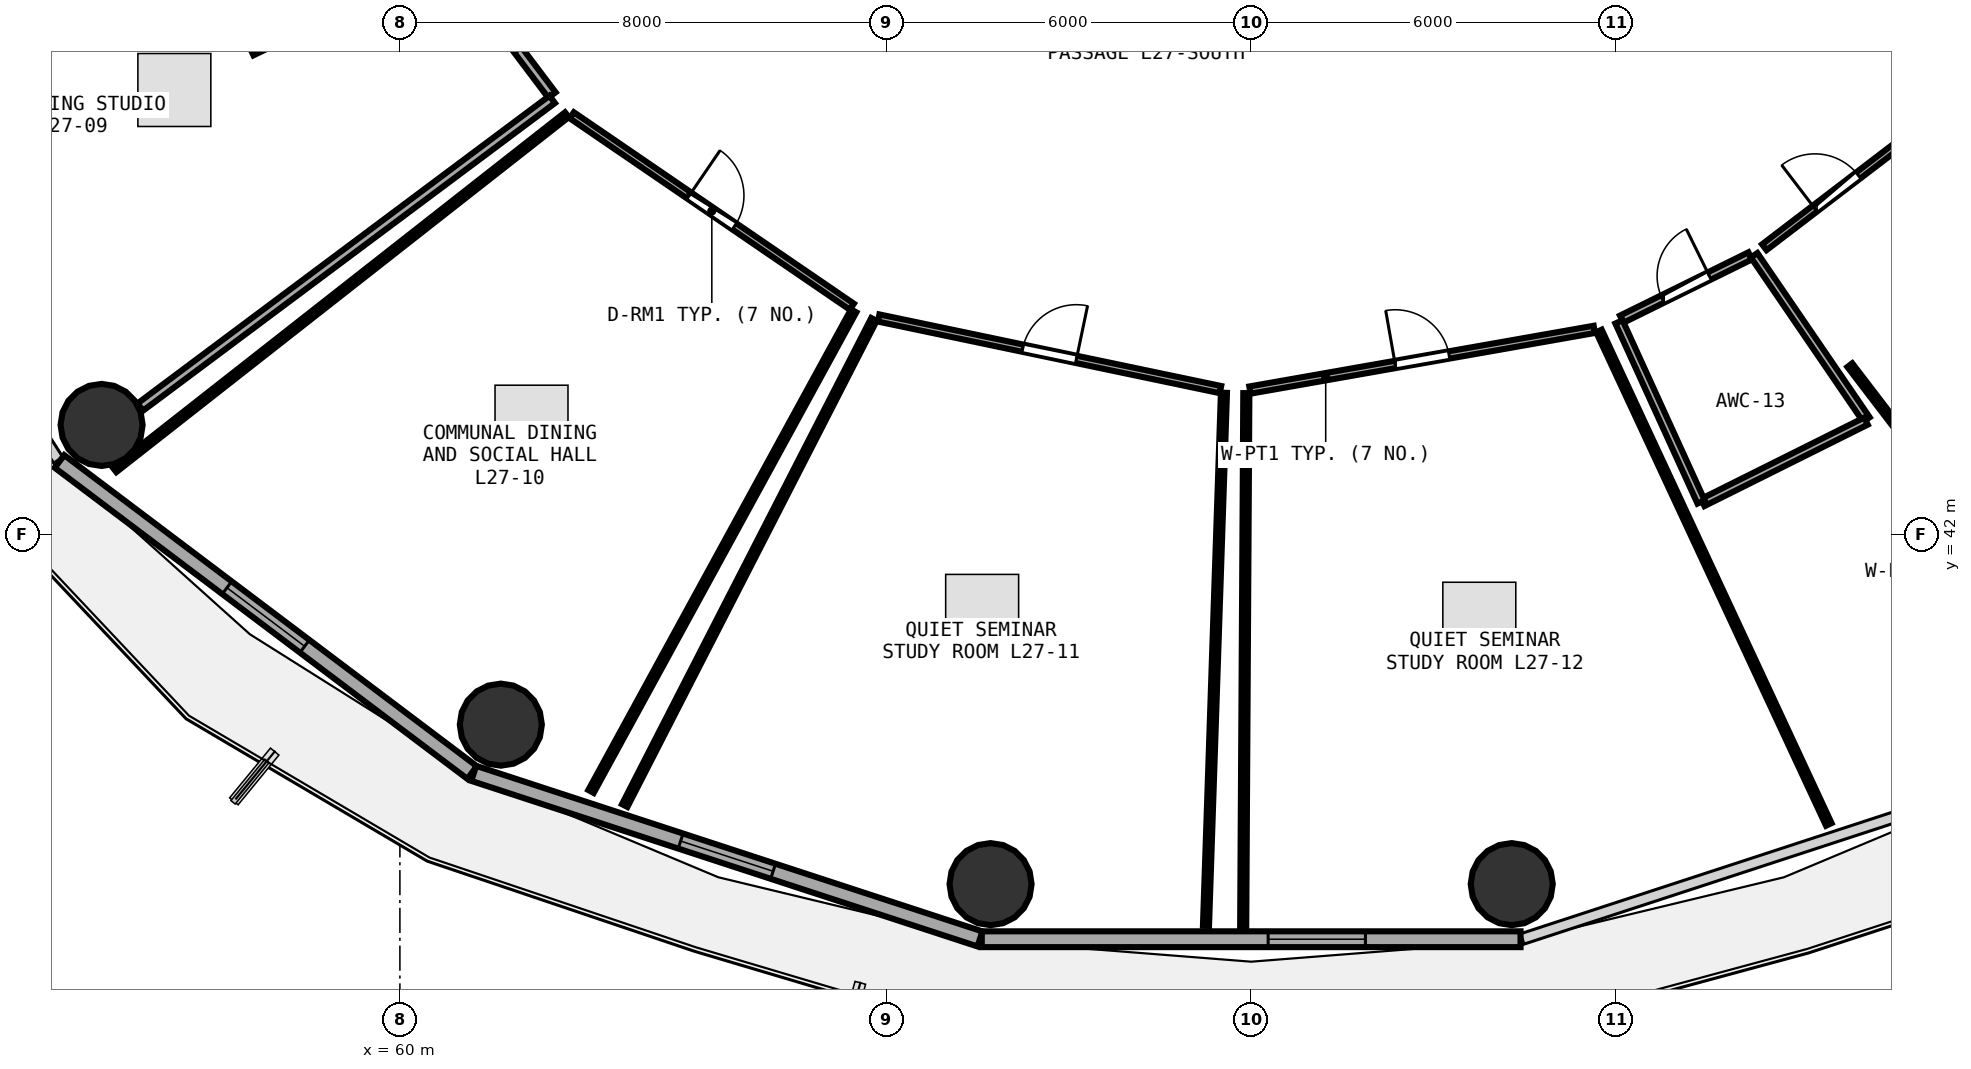
"""IFC4 building model, lengths in metres.
Left out: names, types, materials, properties, quantities, classifications, styles, units other than length and angle.
Written with IfcOpenShell. Run it as: python <this file> out.ifc"""

import sys

from ifc_helpers import new_model, si_unit, direction, frame, frame_2d, origin, origin_2d, place, context, subcontext, project, spatial, rectangle, circle, extrude, element, fill, save


model = new_model("IFC4")
c1 = context("Model", 3, precision=1e-05, world=origin(), true_north=direction((0.0, 1.0)))
c2 = subcontext(c1, "Body", "Model", "MODEL_VIEW")
j1 = project(units=[si_unit("LENGTHUNIT", "METRE"), si_unit("PLANEANGLEUNIT", "RADIAN")], contexts=[c1])
p1 = place(None, origin())
s1 = spatial("IfcSite", under=j1, at=p1, CompositionType="ELEMENT")
p2 = place(p1, origin())
s2 = spatial("IfcBuilding", under=s1, at=p2, CompositionType="ELEMENT")
p3 = place(p2, frame((0.0, 0.0, 106.35)))
s3 = spatial("IfcBuildingStorey", under=s2, at=p3, CompositionType="ELEMENT", Elevation=106.35)
for number, where, z_axis, x_axis in (
    (1, (55.094, 43.807, 0.0), (0.0, 0.0, 1.0), (1.0, 0.0, 0.0)),
    (2, (61.66, 38.878, 0.0), (0.0, 0.0, 1.0), (1.0, 0.0, 0.0)),
    (3, (69.714, 36.255, 0.0), (0.0, 0.0, 1.0), (1.0, 0.0, 0.0)),
    (4, (78.286, 36.255, 0.0), (0.0, 0.0, 1.0), (1.0, 0.0, 0.0)),
):
    element("IfcColumn", number, at=place(p3, frame(where, z_axis=z_axis, x_axis=x_axis)), inside=s3, PredefinedType="COLUMN", context=c2, shape_type="SweptSolid", body=[
        extrude(circle(Radius=0.675, at=origin_2d()), origin(), (0.0, 0.0, 1.0), 3.75),
    ])
p4 = place(p3, frame((54.401, 43.207, 0.0), z_axis=(0.0, 0.0, 1.0), x_axis=(0.798501507879, -0.601992808857, 0.0)))
e5 = element("IfcWall", 5, at=p4, inside=s3, PredefinedType="SOLIDWALL", context=c2, shape_type="SweptSolid", body=[
    extrude(rectangle(XDim=8.499, YDim=0.26, at=frame_2d((4.25, 0.0))), origin(), (0.0, 0.0, 1.0), 3.475),
])
p5 = place(p4, frame((3.45, 0.0, 0.85)))
e6 = element("IfcOpeningElement", 6, at=p5, cuts=e5, PredefinedType="OPENING", context=c2, shape_type="SweptSolid", body=[
    extrude(rectangle(XDim=1.6, YDim=1.45, at=frame_2d((0.8, 0.725))), frame((0.0, 0.14, 0.0), z_axis=(0.0, -1.0, 0.0), x_axis=(1.0, 0.0, 0.0)), (0.0, 0.0, 1.0), 0.28),
])
p6 = place(p3, frame((61.214, 38.077, 0.0), z_axis=(0.0, 0.0, 1.0), x_axis=(0.950471101963, -0.310812941064, 0.0)))
e7 = element("IfcWall", 7, at=p6, inside=s3, PredefinedType="SOLIDWALL", context=c2, shape_type="SweptSolid", body=[
    extrude(rectangle(XDim=8.76, YDim=0.26, at=frame_2d((4.38, 0.0))), origin(), (0.0, 0.0, 1.0), 3.475),
])
p7 = place(p6, frame((3.58, 0.0, 0.85)))
e8 = element("IfcOpeningElement", 8, at=p7, cuts=e7, PredefinedType="OPENING", context=c2, shape_type="SweptSolid", body=[
    extrude(rectangle(XDim=1.6, YDim=1.45, at=frame_2d((0.8, 0.725))), frame((0.0, 0.14, 0.0), z_axis=(0.0, -1.0, 0.0), x_axis=(1.0, 0.0, 0.0)), (0.0, 0.0, 1.0), 0.28),
])
p8 = place(p3, frame((69.57, 35.349, 0.0), z_axis=(0.0, 0.0, 1.0), x_axis=(1.0, 0.0, 0.0)))
e9 = element("IfcWall", 9, at=p8, inside=s3, PredefinedType="SOLIDWALL", context=c2, shape_type="SweptSolid", body=[
    extrude(rectangle(XDim=8.861, YDim=0.26, at=frame_2d((4.43, 0.0))), origin(), (0.0, 0.0, 1.0), 3.475),
])
p9 = place(p8, frame((4.71, 0.0, 0.85)))
e10 = element("IfcOpeningElement", 10, at=p9, cuts=e9, PredefinedType="OPENING", context=c2, shape_type="SweptSolid", body=[
    extrude(rectangle(XDim=1.6, YDim=1.45, at=frame_2d((0.8, 0.725))), frame((0.0, 0.14, 0.0), z_axis=(0.0, -1.0, 0.0), x_axis=(1.0, 0.0, 0.0)), (0.0, 0.0, 1.0), 0.28),
])
p10 = place(p3, frame((60.827, 51.45, 0.0), z_axis=(0.0, 0.0, 1.0), x_axis=(0.602330864847, -0.798246534131, 0.0)))
e11 = element("IfcWall", 11, at=p10, inside=s3, PredefinedType="PARTITIONING", context=c2, shape_type="SweptSolid", body=[
    extrude(rectangle(XDim=2.779, YDim=0.15, at=frame_2d((1.389, 0.0))), origin(), (0.0, 0.0, 1.0), 2.925),
])
p11 = place(p10, frame((0.914, 0.0, 0.0)))
e12 = element("IfcOpeningElement", 12, at=p11, cuts=e11, PredefinedType="OPENING", context=c2, shape_type="SweptSolid", body=[
    extrude(rectangle(XDim=0.95, YDim=2.08, at=frame_2d((0.475, 1.04))), frame((0.0, 0.085, 0.0), z_axis=(0.0, -1.0, 0.0), x_axis=(1.0, 0.0, 0.0)), (0.0, 0.0, 1.0), 0.17),
])
p12 = place(p3, frame((62.827, 48.899, 0.0), z_axis=(0.0, 0.0, 1.0), x_axis=(0.825618475233, -0.564228795219, 0.0)))
e13 = element("IfcWall", 13, at=p12, inside=s3, PredefinedType="PARTITIONING", context=c2, shape_type="SweptSolid", body=[
    extrude(rectangle(XDim=5.578, YDim=0.12, at=frame_2d((2.789, 0.0))), origin(), (0.0, 0.0, 1.0), 2.925),
])
p13 = place(p12, frame((2.339, 0.0, 0.0)))
e14 = element("IfcOpeningElement", 14, at=p13, cuts=e13, PredefinedType="OPENING", context=c2, shape_type="SweptSolid", body=[
    extrude(rectangle(XDim=0.9, YDim=2.08, at=frame_2d((0.45, 1.04))), frame((0.0, 0.07, 0.0), z_axis=(0.0, -1.0, 0.0), x_axis=(1.0, 0.0, 0.0)), (0.0, 0.0, 1.0), 0.14),
])
p14 = place(p3, frame((67.874, 45.566, 0.0), z_axis=(0.0, 0.0, 1.0), x_axis=(0.978759890472, -0.205009943184, 0.0)))
e15 = element("IfcWall", 15, at=p14, inside=s3, PredefinedType="PARTITIONING", context=c2, shape_type="SweptSolid", body=[
    extrude(rectangle(XDim=5.744, YDim=0.12, at=frame_2d((2.872, 0.0))), origin(), (0.0, 0.0, 1.0), 3.235),
])
p15 = place(p14, frame((2.422, 0.0, 0.0)))
e16 = element("IfcOpeningElement", 16, at=p15, cuts=e15, PredefinedType="OPENING", context=c2, shape_type="SweptSolid", body=[
    extrude(rectangle(XDim=0.9, YDim=2.08, at=frame_2d((0.45, 1.04))), frame((0.0, 0.07, 0.0), z_axis=(0.0, -1.0, 0.0), x_axis=(1.0, 0.0, 0.0)), (0.0, 0.0, 1.0), 0.14),
])
p16 = place(p3, frame((73.98, 44.38, 0.0), z_axis=(0.0, 0.0, 1.0), x_axis=(0.984819435921, 0.17358190756, 0.0)))
e17 = element("IfcWall", 17, at=p16, inside=s3, PredefinedType="PARTITIONING", context=c2, shape_type="SweptSolid", body=[
    extrude(rectangle(XDim=5.751, YDim=0.12, at=frame_2d((2.875, 0.0))), origin(), (0.0, 0.0, 1.0), 3.235),
])
p17 = place(p16, frame((2.426, 0.0, 0.0)))
e18 = element("IfcOpeningElement", 18, at=p17, cuts=e17, PredefinedType="OPENING", context=c2, shape_type="SweptSolid", body=[
    extrude(rectangle(XDim=0.9, YDim=2.08, at=frame_2d((0.45, 1.04))), frame((0.0, 0.07, 0.0), z_axis=(0.0, -1.0, 0.0), x_axis=(1.0, 0.0, 0.0)), (0.0, 0.0, 1.0), 0.14),
])
p18 = place(p3, frame((80.095, 45.546, 0.0), z_axis=(0.0, 0.0, 1.0), x_axis=(0.897003770221, 0.442022891046, 0.0)))
e19 = element("IfcWall", 19, at=p18, inside=s3, PredefinedType="PLUMBINGWALL", context=c2, shape_type="SweptSolid", body=[
    extrude(rectangle(XDim=2.355, YDim=0.13, at=frame_2d((1.178, 0.0))), origin(), (0.0, 0.0, 1.0), 2.925),
])
p19 = place(p18, frame((0.747, 0.0, 0.0)))
e20 = element("IfcOpeningElement", 20, at=p19, cuts=e19, PredefinedType="OPENING", context=c2, shape_type="SweptSolid", body=[
    extrude(rectangle(XDim=0.86, YDim=2.05, at=frame_2d((0.43, 1.025))), frame((0.0, 0.075, 0.0), z_axis=(0.0, -1.0, 0.0), x_axis=(1.0, 0.0, 0.0)), (0.0, 0.0, 1.0), 0.15),
])
p20 = place(p3, frame((82.44, 46.729, 0.0), z_axis=(0.0, 0.0, 1.0), x_axis=(0.794654066843, 0.607062528945, 0.0)))
e21 = element("IfcWall", 21, at=p20, inside=s3, PredefinedType="PARTITIONING", context=c2, shape_type="SweptSolid", body=[
    extrude(rectangle(XDim=2.993, YDim=0.12, at=frame_2d((1.497, 0.0))), origin(), (0.0, 0.0, 1.0), 2.925),
])
p21 = place(p20, frame((1.047, 0.0, 0.0)))
e22 = element("IfcOpeningElement", 22, at=p21, cuts=e21, PredefinedType="OPENING", context=c2, shape_type="SweptSolid", body=[
    extrude(rectangle(XDim=0.9, YDim=2.08, at=frame_2d((0.45, 1.04))), frame((0.0, 0.07, 0.0), z_axis=(0.0, -1.0, 0.0), x_axis=(1.0, 0.0, 0.0)), (0.0, 0.0, 1.0), 0.14),
])
p22 = place(p3, frame((62.505, 49.16, 0.0), z_axis=(0.0, 0.0, 1.0), x_axis=(-0.801231684565, -0.598354232582, 0.0)))
e23 = element("IfcWall", 23, at=p22, inside=s3, PredefinedType="PARTITIONING", context=c2, shape_type="SweptSolid", body=[
    extrude(rectangle(XDim=8.456, YDim=0.15, at=frame_2d((4.228, 0.0))), origin(), (0.0, 0.0, 1.0), 2.925),
])
p23 = place(p3, frame((57.559, 49.953, 0.0), z_axis=(0.0, 0.0, 1.0), x_axis=(0.902185129063, 0.431349038364, 0.0)))
e24 = element("IfcWall", 24, at=p23, inside=s3, PredefinedType="PARTITIONING", context=c2, shape_type="SweptSolid", body=[
    extrude(rectangle(XDim=1.298, YDim=0.15, at=frame_2d((0.649, 0.0))), origin(), (0.0, 0.0, 1.0), 3.175),
])
p24 = place(p3, frame((67.463, 45.683, 0.0), z_axis=(0.0, 0.0, 1.0), x_axis=(-0.479571724153, -0.87750268455, 0.0)))
e25 = element("IfcWall", 25, at=p24, inside=s3, PredefinedType="PARTITIONING", context=c2, shape_type="SweptSolid", body=[
    extrude(rectangle(XDim=9.007, YDim=0.1, at=frame_2d((4.503, 0.0))), origin(), (0.0, 0.0, 1.0), 2.925),
])
p25 = place(p3, frame((55.305, 43.071, 0.0), z_axis=(0.0, 0.0, 1.0), x_axis=(0.78679196563, 0.6172182781, 0.0)))
e26 = element("IfcWall", 26, at=p25, inside=s3, PredefinedType="PARTITIONING", context=c2, shape_type="SweptSolid", body=[
    extrude(rectangle(XDim=9.458, YDim=0.1, at=frame_2d((4.729, 0.0))), origin(), (0.0, 0.0, 1.0), 2.925),
])
p26 = place(p3, frame((73.553, 44.336, 0.0), z_axis=(0.0, 0.0, 1.0), x_axis=(-0.033680921614, -0.999432636809, 0.0)))
e27 = element("IfcWall", 27, at=p26, inside=s3, PredefinedType="PARTITIONING", context=c2, shape_type="SweptSolid", body=[
    extrude(rectangle(XDim=8.771, YDim=0.1, at=frame_2d((4.385, 0.0))), origin(), (0.0, 0.0, 1.0), 2.975),
])
p27 = place(p3, frame((63.697, 37.548, 0.0), z_axis=(0.0, 0.0, 1.0), x_axis=(0.456266444918, 0.889843205987, 0.0)))
e28 = element("IfcWall", 28, at=p27, inside=s3, PredefinedType="PARTITIONING", context=c2, shape_type="SweptSolid", body=[
    extrude(rectangle(XDim=8.985, YDim=0.1, at=frame_2d((4.492, 0.0))), origin(), (0.0, 0.0, 1.0), 2.925),
])
p28 = place(p3, frame((79.72, 45.353, 0.0), z_axis=(0.0, 0.0, 1.0), x_axis=(0.422225492456, -0.906490834769, 0.0)))
e29 = element("IfcWall", 29, at=p28, inside=s3, PredefinedType="PARTITIONING", context=c2, shape_type="SweptSolid", body=[
    extrude(rectangle(XDim=8.953, YDim=0.1, at=frame_2d((4.476, 0.0))), origin(), (0.0, 0.0, 1.0), 2.925),
])
p29 = place(p3, frame((73.869, 35.56, 0.0), z_axis=(0.0, 0.0, 1.0), x_axis=(0.005901573079, 0.999982585566, 0.0)))
e30 = element("IfcWall", 30, at=p29, inside=s3, PredefinedType="PARTITIONING", context=c2, shape_type="SweptSolid", body=[
    extrude(rectangle(XDim=8.77, YDim=0.1, at=frame_2d((4.385, 0.0))), origin(), (0.0, 0.0, 1.0), 2.975),
])
p30 = place(p3, frame((82.272, 46.597, 0.0), z_axis=(0.0, 0.0, 1.0), x_axis=(0.56421847533, -0.825625527764, 0.0)))
e31 = element("IfcWall", 31, at=p30, inside=s3, PredefinedType="PLUMBINGWALL", context=c2, shape_type="SweptSolid", body=[
    extrude(rectangle(XDim=3.272, YDim=0.13, at=frame_2d((1.636, 0.0))), origin(), (0.0, 0.0, 1.0), 3.235),
])
p31 = place(p3, frame((84.112, 43.87, 0.0), z_axis=(0.0, 0.0, 1.0), x_axis=(-0.89496337821, -0.446139610059, 0.0)))
e32 = element("IfcWall", 32, at=p31, inside=s3, PredefinedType="PLUMBINGWALL", context=c2, shape_type="SweptSolid", body=[
    extrude(rectangle(XDim=3.001, YDim=0.13, at=frame_2d((1.501, 0.0))), origin(), (0.0, 0.0, 1.0), 3.175),
])
p32 = place(p3, frame((81.4, 42.54, 0.0), z_axis=(0.0, 0.0, 1.0), x_axis=(-0.414882082756, 0.909875187819, 0.0)))
e33 = element("IfcWall", 33, at=p32, inside=s3, PredefinedType="PLUMBINGWALL", context=c2, shape_type="SweptSolid", body=[
    extrude(rectangle(XDim=3.255, YDim=0.13, at=frame_2d((1.627, 0.0))), origin(), (0.0, 0.0, 1.0), 2.925),
])
p33 = place(p3, frame((87.98, 39.383, 0.0), z_axis=(0.0, 0.0, 1.0), x_axis=(-0.607281003039, 0.794487119687, 0.0)))
e34 = element("IfcWall", 34, at=p33, inside=s3, PredefinedType="PARTITIONING", context=c2, shape_type="SweptSolid", body=[
    extrude(rectangle(XDim=6.806, YDim=0.1, at=frame_2d((3.403, 0.0))), origin(), (0.0, 0.0, 1.0), 2.925),
])
p34 = place(p5, origin())
e35 = element("IfcWindow", 35, at=p34, inside=s3, PartitioningType="SINGLE_PANEL", PredefinedType="WINDOW", context=c2, shape_type="SweptSolid", body=[
    extrude(rectangle(XDim=1.6, YDim=1.45, at=frame_2d((0.8, 0.725))), frame((0.0, 0.03, 0.0), z_axis=(0.0, -1.0, 0.0), x_axis=(1.0, 0.0, 0.0)), (0.0, 0.0, 1.0), 0.06),
])
fill(e6, e35)
p35 = place(p7, origin())
e36 = element("IfcWindow", 36, at=p35, inside=s3, PartitioningType="SINGLE_PANEL", PredefinedType="WINDOW", context=c2, shape_type="SweptSolid", body=[
    extrude(rectangle(XDim=1.6, YDim=1.45, at=frame_2d((0.8, 0.725))), frame((0.0, 0.03, 0.0), z_axis=(0.0, -1.0, 0.0), x_axis=(1.0, 0.0, 0.0)), (0.0, 0.0, 1.0), 0.06),
])
fill(e8, e36)
p36 = place(p9, origin())
e37 = element("IfcWindow", 37, at=p36, inside=s3, PartitioningType="SINGLE_PANEL", PredefinedType="WINDOW", context=c2, shape_type="SweptSolid", body=[
    extrude(rectangle(XDim=1.6, YDim=1.45, at=frame_2d((0.8, 0.725))), frame((0.0, 0.03, 0.0), z_axis=(0.0, -1.0, 0.0), x_axis=(1.0, 0.0, 0.0)), (0.0, 0.0, 1.0), 0.06),
])
fill(e10, e37)
p37 = place(p13, origin())
e38 = element("IfcDoor", 38, at=p37, inside=s3, OperationType="SINGLE_SWING_LEFT", PredefinedType="DOOR", context=c2, shape_type="SweptSolid", body=[
    extrude(rectangle(XDim=0.9, YDim=2.08, at=frame_2d((0.45, 1.04))), frame((0.0, 0.025, 0.0), z_axis=(0.0, -1.0, 0.0), x_axis=(1.0, 0.0, 0.0)), (0.0, 0.0, 1.0), 0.05),
])
fill(e14, e38)
p38 = place(p15, origin())
e39 = element("IfcDoor", 39, at=p38, inside=s3, OperationType="SINGLE_SWING_RIGHT", PredefinedType="DOOR", context=c2, shape_type="SweptSolid", body=[
    extrude(rectangle(XDim=0.9, YDim=2.08, at=frame_2d((0.45, 1.04))), frame((0.0, 0.025, 0.0), z_axis=(0.0, -1.0, 0.0), x_axis=(1.0, 0.0, 0.0)), (0.0, 0.0, 1.0), 0.05),
])
fill(e16, e39)
p39 = place(p17, origin())
e40 = element("IfcDoor", 40, at=p39, inside=s3, OperationType="SINGLE_SWING_LEFT", PredefinedType="DOOR", context=c2, shape_type="SweptSolid", body=[
    extrude(rectangle(XDim=0.9, YDim=2.08, at=frame_2d((0.45, 1.04))), frame((0.0, 0.025, 0.0), z_axis=(0.0, -1.0, 0.0), x_axis=(1.0, 0.0, 0.0)), (0.0, 0.0, 1.0), 0.05),
])
fill(e18, e40)
p40 = place(p19, origin())
e41 = element("IfcDoor", 41, at=p40, inside=s3, OperationType="SINGLE_SWING_RIGHT", PredefinedType="DOOR", context=c2, shape_type="SweptSolid", body=[
    extrude(rectangle(XDim=0.86, YDim=2.05, at=frame_2d((0.43, 1.025))), frame((0.0, 0.025, 0.0), z_axis=(0.0, -1.0, 0.0), x_axis=(1.0, 0.0, 0.0)), (0.0, 0.0, 1.0), 0.05),
])
fill(e20, e41)
p41 = place(p21, origin())
e42 = element("IfcDoor", 42, at=p41, inside=s3, OperationType="SINGLE_SWING_LEFT", PredefinedType="DOOR", context=c2, shape_type="SweptSolid", body=[
    extrude(rectangle(XDim=0.9, YDim=2.08, at=frame_2d((0.45, 1.04))), frame((0.0, 0.025, 0.0), z_axis=(0.0, -1.0, 0.0), x_axis=(1.0, 0.0, 0.0)), (0.0, 0.0, 1.0), 0.05),
])
fill(e22, e42)
save(model, sys.argv[1])
